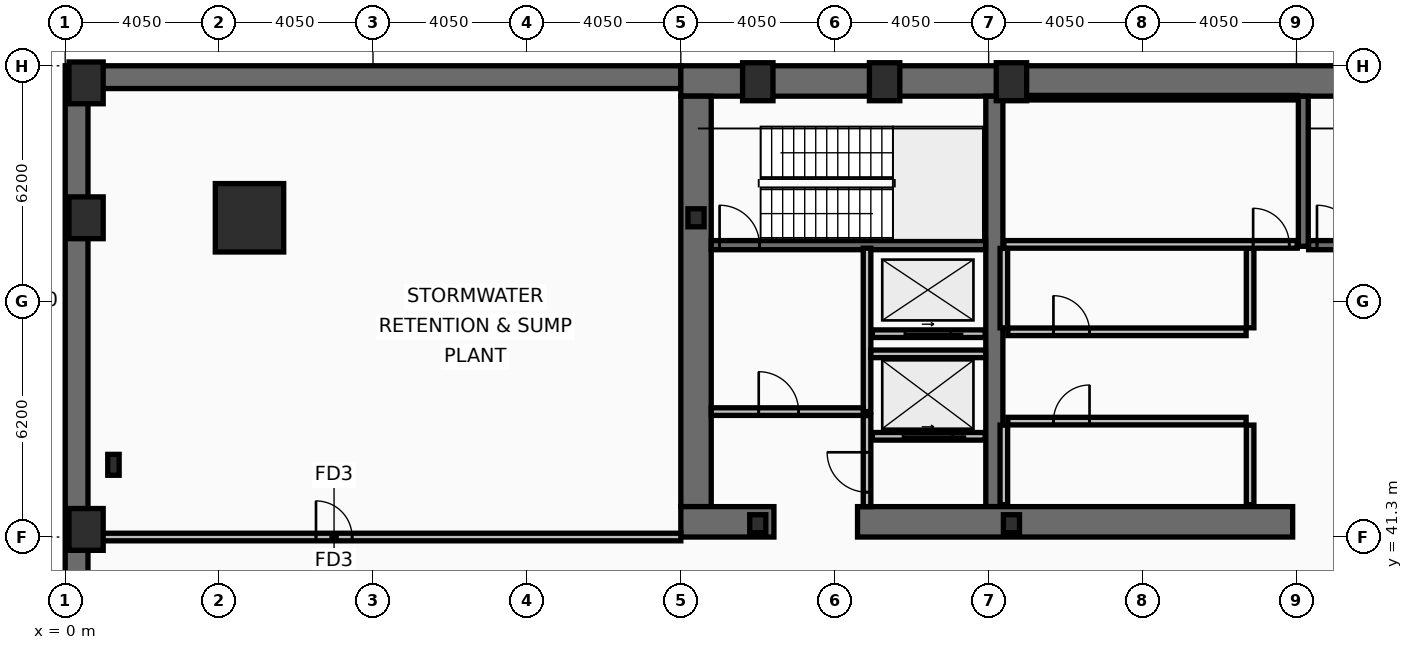
"""IFC4 building model, lengths in metres.
Left out: names, types, materials, properties, quantities, classifications, styles, units other than length and angle.
Written with IfcOpenShell. Run it as: python <this file> out.ifc"""

import sys

from ifc_helpers import new_model, si_unit, direction, frame, frame_2d, origin, origin_2d, place, context, subcontext, project, spatial, rectangle, hollow_rectangle, i_section, extrude, element, fill, save


model = new_model("IFC4")
c1 = context("Model", 3, precision=1e-05, world=origin(), true_north=direction((0.0, 1.0)))
c2 = subcontext(c1, "Body", "Model", "MODEL_VIEW")
j1 = project(units=[si_unit("LENGTHUNIT", "METRE"), si_unit("PLANEANGLEUNIT", "RADIAN")], contexts=[c1])
p1 = place(None, origin())
s1 = spatial("IfcSite", under=j1, at=p1, CompositionType="ELEMENT")
p2 = place(p1, origin())
s2 = spatial("IfcBuilding", under=s1, at=p2, CompositionType="ELEMENT")
p3 = place(p2, frame((0.0, 0.0, -9.0)))
s3 = spatial("IfcBuildingStorey", under=s2, at=p3, CompositionType="ELEMENT", Elevation=-9.0)
p4 = place(p3, frame((0.3, 0.0, -0.2), z_axis=(0.0, 0.0, 1.0), x_axis=(0.0, 1.0, 0.0)))
e1 = element("IfcWall", 1, at=p4, inside=s3, PredefinedType="SOLIDWALL", context=c2, shape_type="SweptSolid", body=[
    extrude(rectangle(XDim=53.7, YDim=0.6, at=frame_2d((26.85, 0.0))), origin(), (0.0, 0.0, 1.0), 4.48),
])
p5 = place(p3, frame((0.6, 53.4, -0.2), z_axis=(0.0, 0.0, 1.0), x_axis=(1.0, 0.0, 0.0)))
e2 = element("IfcWall", 2, at=p5, inside=s3, PredefinedType="SOLIDWALL", context=c2, shape_type="SweptSolid", body=[
    extrude(rectangle(XDim=15.6, YDim=0.6, at=frame_2d((7.8, 0.0))), origin(), (0.0, 0.0, 1.0), 4.48),
])
p6 = place(p3, frame((16.2, 53.3, -0.2), z_axis=(0.0, 0.0, 1.0), x_axis=(1.0, 0.0, 0.0)))
e3 = element("IfcWall", 3, at=p6, inside=s3, PredefinedType="SHEAR", context=c2, shape_type="SweptSolid", body=[
    extrude(rectangle(XDim=40.5, YDim=0.8, at=frame_2d((20.25, 0.0))), origin(), (0.0, 0.0, 1.0), 4.48),
])
p7 = place(p3, frame((16.6, 42.1, -0.2), z_axis=(0.0, 0.0, 1.0), x_axis=(0.0, 1.0, 0.0)))
e4 = element("IfcWall", 4, at=p7, inside=s3, PredefinedType="SHEAR", context=c2, shape_type="SweptSolid", body=[
    extrude(rectangle(XDim=10.8, YDim=0.8, at=frame_2d((5.4, 0.0))), origin(), (0.0, 0.0, 1.0), 4.48),
])
p8 = place(p3, frame((24.45, 42.1, -0.2), z_axis=(0.0, 0.0, 1.0), x_axis=(0.0, 1.0, 0.0)))
e5 = element("IfcWall", 5, at=p8, inside=s3, PredefinedType="SHEAR", context=c2, shape_type="SweptSolid", body=[
    extrude(rectangle(XDim=10.8, YDim=0.45, at=frame_2d((5.4, 0.0))), origin(), (0.0, 0.0, 1.0), 4.48),
])
p9 = place(p3, frame((18.65, 41.7, -0.2), z_axis=(0.0, 0.0, 1.0), x_axis=(-1.0, 0.0, 0.0)))
e6 = element("IfcWall", 6, at=p9, inside=s3, PredefinedType="SHEAR", context=c2, shape_type="SweptSolid", body=[
    extrude(rectangle(XDim=2.45, YDim=0.8, at=frame_2d((1.225, 0.0))), origin(), (0.0, 0.0, 1.0), 4.48),
])
p10 = place(p3, frame((32.3, 41.7, -0.2), z_axis=(0.0, 0.0, 1.0), x_axis=(-1.0, 0.0, 0.0)))
e7 = element("IfcWall", 7, at=p10, inside=s3, PredefinedType="SHEAR", context=c2, shape_type="SweptSolid", body=[
    extrude(rectangle(XDim=11.45, YDim=0.8, at=frame_2d((5.725, 0.0))), origin(), (0.0, 0.0, 1.0), 4.48),
])
p11 = place(p3, frame((32.58, 48.95, -0.2), z_axis=(0.0, 0.0, 1.0), x_axis=(0.0, 1.0, 0.0)))
e8 = element("IfcWall", 8, at=p11, inside=s3, PredefinedType="SHEAR", context=c2, shape_type="SweptSolid", body=[
    extrude(rectangle(XDim=3.95, YDim=0.26, at=frame_2d((1.975, 0.0))), origin(), (0.0, 0.0, 1.0), 4.48),
])
p12 = place(p3, frame((17.0, 48.98, 0.0), z_axis=(0.0, 0.0, 1.0), x_axis=(1.0, 0.0, 0.0)))
e9 = element("IfcWall", 9, at=p12, inside=s3, PredefinedType="SHEAR", context=c2, shape_type="SweptSolid", body=[
    extrude(rectangle(XDim=7.22, YDim=0.24, at=frame_2d((3.61, 0.0))), origin(), (0.0, 0.0, 1.0), 4.28),
])
p13 = place(p12, frame((0.22, 0.0, 0.0)))
e10 = element("IfcOpeningElement", 10, at=p13, cuts=e9, PredefinedType="OPENING", context=c2, shape_type="SweptSolid", body=[
    extrude(rectangle(XDim=1.05, YDim=2.15, at=frame_2d((0.525, 1.075))), frame((0.0, 0.13, 0.0), z_axis=(0.0, -1.0, 0.0), x_axis=(1.0, 0.0, 0.0)), (0.0, 0.0, 1.0), 0.26),
])
p14 = place(p3, frame((32.72, 48.98, 0.0), z_axis=(0.0, 0.0, 1.0), x_axis=(1.0, 0.0, 0.0)))
e11 = element("IfcWall", 11, at=p14, inside=s3, PredefinedType="SHEAR", context=c2, shape_type="SweptSolid", body=[
    extrude(rectangle(XDim=7.56, YDim=0.24, at=frame_2d((3.78, 0.0))), origin(), (0.0, 0.0, 1.0), 4.28),
])
p15 = place(p14, frame((0.22, 0.0, 0.0)))
e12 = element("IfcOpeningElement", 12, at=p15, cuts=e11, PredefinedType="OPENING", context=c2, shape_type="SweptSolid", body=[
    extrude(rectangle(XDim=1.05, YDim=2.15, at=frame_2d((0.525, 1.075))), frame((0.0, 0.13, 0.0), z_axis=(0.0, -1.0, 0.0), x_axis=(1.0, 0.0, 0.0)), (0.0, 0.0, 1.0), 0.26),
])
p16 = place(p3, frame((4.85, 49.7, -0.2), z_axis=(0.0, 0.0, 1.0), x_axis=(1.0, 0.0, 0.0)))
e13 = element("IfcColumn", 13, at=p16, inside=s3, PredefinedType="COLUMN", context=c2, shape_type="SweptSolid", body=[
    extrude(hollow_rectangle(XDim=1.8, YDim=1.8, WallThickness=0.08, at=origin_2d()), origin(), (0.0, 0.0, 1.0), 4.7),
])
for number, where, z_axis, x_axis in (
    (14, (18.225, 53.28, -0.2), (0.0, 0.0, 1.0), (1.0, 0.0, 0.0)),
    (15, (21.562, 53.28, -0.2), (0.0, 0.0, 1.0), (1.0, 0.0, 0.0)),
    (16, (24.9, 53.28, -0.2), (0.0, 0.0, 1.0), (1.0, 0.0, 0.0)),
):
    element("IfcColumn", number, at=place(p3, frame(where, z_axis=z_axis, x_axis=x_axis)), inside=s3, PredefinedType="COLUMN", context=c2, shape_type="SweptSolid", body=[
        extrude(hollow_rectangle(XDim=0.8, YDim=1.0, WallThickness=0.055, at=origin_2d()), origin(), (0.0, 0.0, 1.0), 4.7),
    ])
p17 = place(p3, frame((1.27, 43.2, -0.2), z_axis=(0.0, 0.0, 1.0), x_axis=(1.0, 0.0, 0.0)))
e17 = element("IfcColumn", 17, at=p17, inside=s3, PredefinedType="COLUMN", context=c2, shape_type="SweptSolid", body=[
    extrude(i_section(OverallWidth=0.3, OverallDepth=0.55, WebThickness=0.015, FlangeThickness=0.029, at=origin_2d()), origin(), (0.0, 0.0, 1.0), 4.7),
])
for number, where, z_axis, x_axis in (
    (18, (16.6, 49.7, -0.2), (0.0, 0.0, 1.0), (1.0, 0.0, 0.0)),
    (19, (18.225, 41.65, -0.2), (0.0, 0.0, 1.0), (1.0, 0.0, 0.0)),
    (20, (24.9, 41.65, -0.2), (0.0, 0.0, 1.0), (1.0, 0.0, 0.0)),
):
    element("IfcColumn", number, at=place(p3, frame(where, z_axis=z_axis, x_axis=x_axis)), inside=s3, PredefinedType="COLUMN", context=c2, shape_type="SweptSolid", body=[
        extrude(i_section(OverallWidth=0.424, OverallDepth=0.474, WebThickness=0.048, FlangeThickness=0.077, at=origin_2d()), origin(), (0.0, 0.0, 1.0), 4.7),
    ])
for number, where, z_axis, x_axis in (
    (21, (0.55, 49.7, -0.2), (0.0, 0.0, 1.0), (1.0, 0.0, 0.0)),
    (22, (0.55, 53.25, -0.2), (0.0, 0.0, 1.0), (1.0, 0.0, 0.0)),
    (23, (0.55, 41.5, -0.2), (0.0, 0.0, 1.0), (1.0, 0.0, 0.0)),
):
    element("IfcColumn", number, at=place(p3, frame(where, z_axis=z_axis, x_axis=x_axis)), inside=s3, PredefinedType="PILASTER", context=c2, shape_type="SweptSolid", body=[
        extrude(rectangle(XDim=0.9, YDim=1.1, at=origin_2d()), origin(), (0.0, 0.0, 1.0), 4.7),
    ])
p18 = place(p3, frame((24.21, 43.95, 0.0), z_axis=(0.0, 0.0, 1.0), x_axis=(-1.0, 0.0, 0.0)))
e24 = element("IfcWall", 24, at=p18, inside=s3, PredefinedType="PARTITIONING", context=c2, shape_type="SweptSolid", body=[
    extrude(rectangle(XDim=2.97, YDim=0.2, at=frame_2d((1.485, 0.0))), origin(), (0.0, 0.0, 1.0), 4.28),
])
p19 = place(p18, frame((0.86, 0.0, 0.0)))
e25 = element("IfcOpeningElement", 25, at=p19, cuts=e24, PredefinedType="OPENING", context=c2, shape_type="SweptSolid", body=[
    extrude(rectangle(XDim=1.3, YDim=2.18, at=frame_2d((0.65, 1.09))), frame((0.0, 0.11, 0.0), z_axis=(0.0, -1.0, 0.0), x_axis=(1.0, 0.0, 0.0)), (0.0, 0.0, 1.0), 0.22),
])
p20 = place(p3, frame((24.21, 46.65, 0.0), z_axis=(0.0, 0.0, 1.0), x_axis=(-1.0, 0.0, 0.0)))
e26 = element("IfcWall", 26, at=p20, inside=s3, PredefinedType="PARTITIONING", context=c2, shape_type="SweptSolid", body=[
    extrude(rectangle(XDim=2.97, YDim=0.2, at=frame_2d((1.485, 0.0))), origin(), (0.0, 0.0, 1.0), 4.28),
])
p21 = place(p20, frame((0.91, 0.0, 0.0)))
e27 = element("IfcOpeningElement", 27, at=p21, cuts=e26, PredefinedType="OPENING", context=c2, shape_type="SweptSolid", body=[
    extrude(rectangle(XDim=1.2, YDim=2.18, at=frame_2d((0.6, 1.09))), frame((0.0, 0.11, 0.0), z_axis=(0.0, -1.0, 0.0), x_axis=(1.0, 0.0, 0.0)), (0.0, 0.0, 1.0), 0.22),
])
p22 = place(p3, frame((21.1, 44.6, 0.0), z_axis=(0.0, 0.0, 1.0), x_axis=(0.0, 1.0, 0.0)))
e28 = element("IfcWall", 28, at=p22, inside=s3, PredefinedType="PARTITIONING", context=c2, shape_type="SweptSolid", body=[
    extrude(rectangle(XDim=4.3, YDim=0.2, at=frame_2d((2.15, 0.0))), origin(), (0.0, 0.0, 1.0), 4.28),
])
p23 = place(p3, frame((17.0, 44.6, 0.0), z_axis=(0.0, 0.0, 1.0), x_axis=(1.0, 0.0, 0.0)))
e29 = element("IfcWall", 29, at=p23, inside=s3, PredefinedType="PARTITIONING", context=c2, shape_type="SweptSolid", body=[
    extrude(rectangle(XDim=4.0, YDim=0.2, at=frame_2d((2.0, 0.0))), origin(), (0.0, 0.0, 1.0), 4.28),
])
p24 = place(p23, frame((1.25, 0.0, 0.0)))
e30 = element("IfcOpeningElement", 30, at=p24, cuts=e29, PredefinedType="OPENING", context=c2, shape_type="SweptSolid", body=[
    extrude(rectangle(XDim=1.05, YDim=2.15, at=frame_2d((0.525, 1.075))), frame((0.0, 0.11, 0.0), z_axis=(0.0, -1.0, 0.0), x_axis=(1.0, 0.0, 0.0)), (0.0, 0.0, 1.0), 0.22),
])
p25 = place(p3, frame((21.2, 46.12, 0.0), z_axis=(0.0, 0.0, 1.0), x_axis=(1.0, 0.0, 0.0)))
e31 = element("IfcWall", 31, at=p25, inside=s3, PredefinedType="PARTITIONING", context=c2, shape_type="SweptSolid", body=[
    extrude(rectangle(XDim=3.02, YDim=0.2, at=frame_2d((1.51, 0.0))), origin(), (0.0, 0.0, 1.0), 4.28),
])
p26 = place(p3, frame((21.1, 42.1, 0.0), z_axis=(0.0, 0.0, 1.0), x_axis=(0.0, 1.0, 0.0)))
e32 = element("IfcWall", 32, at=p26, inside=s3, PredefinedType="PARTITIONING", context=c2, shape_type="SweptSolid", body=[
    extrude(rectangle(XDim=2.395, YDim=0.2, at=frame_2d((1.198, 0.0))), origin(), (0.0, 0.0, 1.0), 4.28),
])
p27 = place(p26, frame((0.38, 0.0, 0.0)))
e33 = element("IfcOpeningElement", 33, at=p27, cuts=e32, PredefinedType="OPENING", context=c2, shape_type="SweptSolid", body=[
    extrude(rectangle(XDim=1.05, YDim=2.15, at=frame_2d((0.525, 1.075))), frame((0.0, 0.11, 0.0), z_axis=(0.0, -1.0, 0.0), x_axis=(1.0, 0.0, 0.0)), (0.0, 0.0, 1.0), 0.22),
])
for number, where, z_axis, x_axis in (
    (34, (24.7, 46.805, 0.0), (0.0, 0.0, 1.0), (0.0, 1.0, 0.0)),
    (35, (31.18, 46.805, 0.0), (0.0, 0.0, 1.0), (0.0, 1.0, 0.0)),
):
    element("IfcWall", number, at=place(p3, frame(where, z_axis=z_axis, x_axis=x_axis)), inside=s3, PredefinedType="PARTITIONING", context=c2, shape_type="SweptSolid", body=[
        extrude(rectangle(XDim=2.09, YDim=0.2, at=frame_2d((1.045, 0.0))), origin(), (0.0, 0.0, 1.0), 4.28),
    ])
p28 = place(p3, frame((24.805, 46.7, 0.0), z_axis=(0.0, 0.0, 1.0), x_axis=(1.0, 0.0, 0.0)))
e36 = element("IfcWall", 36, at=p28, inside=s3, PredefinedType="PARTITIONING", context=c2, shape_type="SweptSolid", body=[
    extrude(rectangle(XDim=6.27, YDim=0.2, at=frame_2d((3.135, 0.0))), origin(), (0.0, 0.0, 1.0), 4.28),
])
p29 = place(p28, frame((1.2, 0.0, 0.0)))
e37 = element("IfcOpeningElement", 37, at=p29, cuts=e36, PredefinedType="OPENING", context=c2, shape_type="SweptSolid", body=[
    extrude(rectangle(XDim=0.95, YDim=2.1, at=frame_2d((0.475, 1.05))), frame((0.0, 0.11, 0.0), z_axis=(0.0, -1.0, 0.0), x_axis=(1.0, 0.0, 0.0)), (0.0, 0.0, 1.0), 0.22),
])
for number, where, z_axis, x_axis in (
    (38, (24.7, 42.15, 0.0), (0.0, 0.0, 1.0), (0.0, 1.0, 0.0)),
    (39, (31.18, 42.15, 0.0), (0.0, 0.0, 1.0), (0.0, 1.0, 0.0)),
):
    element("IfcWall", number, at=place(p3, frame(where, z_axis=z_axis, x_axis=x_axis)), inside=s3, PredefinedType="PARTITIONING", context=c2, shape_type="SweptSolid", body=[
        extrude(rectangle(XDim=2.095, YDim=0.2, at=frame_2d((1.048, 0.0))), origin(), (0.0, 0.0, 1.0), 4.28),
    ])
p30 = place(p3, frame((24.805, 44.35, 0.0), z_axis=(0.0, 0.0, 1.0), x_axis=(1.0, 0.0, 0.0)))
e40 = element("IfcWall", 40, at=p30, inside=s3, PredefinedType="PARTITIONING", context=c2, shape_type="SweptSolid", body=[
    extrude(rectangle(XDim=6.27, YDim=0.2, at=frame_2d((3.135, 0.0))), origin(), (0.0, 0.0, 1.0), 4.28),
])
p31 = place(p30, frame((1.2, 0.0, 0.0)))
e41 = element("IfcOpeningElement", 41, at=p31, cuts=e40, PredefinedType="OPENING", context=c2, shape_type="SweptSolid", body=[
    extrude(rectangle(XDim=0.95, YDim=2.1, at=frame_2d((0.475, 1.05))), frame((0.0, 0.11, 0.0), z_axis=(0.0, -1.0, 0.0), x_axis=(1.0, 0.0, 0.0)), (0.0, 0.0, 1.0), 0.22),
])
p32 = place(p3, frame((24.7, 52.86, 0.0), z_axis=(0.0, 0.0, 1.0), x_axis=(1.0, 0.0, 0.0)))
e42 = element("IfcWall", 42, at=p32, inside=s3, PredefinedType="PARTITIONING", context=c2, shape_type="SweptSolid", body=[
    extrude(rectangle(XDim=7.72, YDim=0.12, at=frame_2d((3.86, 0.0))), origin(), (0.0, 0.0, 1.0), 4.28),
])
p33 = place(p3, frame((24.7, 49.0, 0.0), z_axis=(0.0, 0.0, 1.0), x_axis=(1.0, 0.0, 0.0)))
e43 = element("IfcWall", 43, at=p33, inside=s3, PredefinedType="PARTITIONING", context=c2, shape_type="SweptSolid", body=[
    extrude(rectangle(XDim=7.72, YDim=0.2, at=frame_2d((3.86, 0.0))), origin(), (0.0, 0.0, 1.0), 4.28),
])
p34 = place(p33, frame((6.56, 0.0, 0.0)))
e44 = element("IfcOpeningElement", 44, at=p34, cuts=e43, PredefinedType="OPENING", context=c2, shape_type="SweptSolid", body=[
    extrude(rectangle(XDim=0.95, YDim=2.1, at=frame_2d((0.475, 1.05))), frame((0.0, 0.11, 0.0), z_axis=(0.0, -1.0, 0.0), x_axis=(1.0, 0.0, 0.0)), (0.0, 0.0, 1.0), 0.22),
])
p35 = place(p3, frame((0.6, 41.3, 0.0), z_axis=(0.0, 0.0, 1.0), x_axis=(1.0, 0.0, 0.0)))
e45 = element("IfcWall", 45, at=p35, inside=s3, PredefinedType="PARTITIONING", context=c2, shape_type="SweptSolid", body=[
    extrude(rectangle(XDim=15.6, YDim=0.2, at=frame_2d((7.8, 0.0))), origin(), (0.0, 0.0, 1.0), 3.62),
])
p36 = place(p35, frame((6.0, 0.0, 0.0)))
e46 = element("IfcOpeningElement", 46, at=p36, cuts=e45, PredefinedType="OPENING", context=c2, shape_type="SweptSolid", body=[
    extrude(rectangle(XDim=0.95, YDim=2.1, at=frame_2d((0.475, 1.05))), frame((0.0, 0.11, 0.0), z_axis=(0.0, -1.0, 0.0), x_axis=(1.0, 0.0, 0.0)), (0.0, 0.0, 1.0), 0.22),
])
p37 = place(p13, origin())
e47 = element("IfcDoor", 47, at=p37, inside=s3, OperationType="SINGLE_SWING_LEFT", PredefinedType="DOOR", context=c2, shape_type="SweptSolid", body=[
    extrude(rectangle(XDim=1.05, YDim=2.15, at=frame_2d((0.525, 1.075))), frame((0.0, 0.025, 0.0), z_axis=(0.0, -1.0, 0.0), x_axis=(1.0, 0.0, 0.0)), (0.0, 0.0, 1.0), 0.05),
])
fill(e10, e47)
p38 = place(p15, origin())
e48 = element("IfcDoor", 48, at=p38, inside=s3, OperationType="SINGLE_SWING_LEFT", PredefinedType="DOOR", context=c2, shape_type="SweptSolid", body=[
    extrude(rectangle(XDim=1.05, YDim=2.15, at=frame_2d((0.525, 1.075))), frame((0.0, 0.025, 0.0), z_axis=(0.0, -1.0, 0.0), x_axis=(1.0, 0.0, 0.0)), (0.0, 0.0, 1.0), 0.05),
])
fill(e12, e48)
p39 = place(p19, origin())
e49 = element("IfcDoor", 49, at=p39, inside=s3, OperationType="SLIDING_TO_LEFT", PredefinedType="DOOR", context=c2, shape_type="SweptSolid", body=[
    extrude(rectangle(XDim=1.3, YDim=2.18, at=frame_2d((0.65, 1.09))), frame((0.0, 0.025, 0.0), z_axis=(0.0, -1.0, 0.0), x_axis=(1.0, 0.0, 0.0)), (0.0, 0.0, 1.0), 0.05),
])
fill(e25, e49)
p40 = place(p21, origin())
e50 = element("IfcDoor", 50, at=p40, inside=s3, OperationType="SLIDING_TO_LEFT", PredefinedType="DOOR", context=c2, shape_type="SweptSolid", body=[
    extrude(rectangle(XDim=1.2, YDim=2.18, at=frame_2d((0.6, 1.09))), frame((0.0, 0.025, 0.0), z_axis=(0.0, -1.0, 0.0), x_axis=(1.0, 0.0, 0.0)), (0.0, 0.0, 1.0), 0.05),
])
fill(e27, e50)
p41 = place(p24, origin())
e51 = element("IfcDoor", 51, at=p41, inside=s3, OperationType="SINGLE_SWING_LEFT", PredefinedType="DOOR", context=c2, shape_type="SweptSolid", body=[
    extrude(rectangle(XDim=1.05, YDim=2.15, at=frame_2d((0.525, 1.075))), frame((0.0, 0.025, 0.0), z_axis=(0.0, -1.0, 0.0), x_axis=(1.0, 0.0, 0.0)), (0.0, 0.0, 1.0), 0.05),
])
fill(e30, e51)
p42 = place(p27, origin())
e52 = element("IfcDoor", 52, at=p42, inside=s3, OperationType="SINGLE_SWING_RIGHT", PredefinedType="DOOR", context=c2, shape_type="SweptSolid", body=[
    extrude(rectangle(XDim=1.05, YDim=2.15, at=frame_2d((0.525, 1.075))), frame((0.0, 0.025, 0.0), z_axis=(0.0, -1.0, 0.0), x_axis=(1.0, 0.0, 0.0)), (0.0, 0.0, 1.0), 0.05),
])
fill(e33, e52)
p43 = place(p29, origin())
e53 = element("IfcDoor", 53, at=p43, inside=s3, OperationType="SINGLE_SWING_LEFT", PredefinedType="DOOR", context=c2, shape_type="SweptSolid", body=[
    extrude(rectangle(XDim=0.95, YDim=2.1, at=frame_2d((0.475, 1.05))), frame((0.0, 0.025, 0.0), z_axis=(0.0, -1.0, 0.0), x_axis=(1.0, 0.0, 0.0)), (0.0, 0.0, 1.0), 0.05),
])
fill(e37, e53)
p44 = place(p31, origin())
e54 = element("IfcDoor", 54, at=p44, inside=s3, OperationType="SINGLE_SWING_RIGHT", PredefinedType="DOOR", context=c2, shape_type="SweptSolid", body=[
    extrude(rectangle(XDim=0.95, YDim=2.1, at=frame_2d((0.475, 1.05))), frame((0.0, 0.025, 0.0), z_axis=(0.0, -1.0, 0.0), x_axis=(1.0, 0.0, 0.0)), (0.0, 0.0, 1.0), 0.05),
])
fill(e41, e54)
p45 = place(p34, origin())
e55 = element("IfcDoor", 55, at=p45, inside=s3, OperationType="SINGLE_SWING_LEFT", PredefinedType="DOOR", context=c2, shape_type="SweptSolid", body=[
    extrude(rectangle(XDim=0.95, YDim=2.1, at=frame_2d((0.475, 1.05))), frame((0.0, 0.025, 0.0), z_axis=(0.0, -1.0, 0.0), x_axis=(1.0, 0.0, 0.0)), (0.0, 0.0, 1.0), 0.05),
])
fill(e44, e55)
p46 = place(p36, origin())
e56 = element("IfcDoor", 56, at=p46, inside=s3, OperationType="SINGLE_SWING_LEFT", PredefinedType="DOOR", context=c2, shape_type="SweptSolid", body=[
    extrude(rectangle(XDim=0.95, YDim=2.1, at=frame_2d((0.475, 1.05))), frame((0.0, 0.025, 0.0), z_axis=(0.0, -1.0, 0.0), x_axis=(1.0, 0.0, 0.0)), (0.0, 0.0, 1.0), 0.05),
])
fill(e46, e56)
save(model, sys.argv[1])
